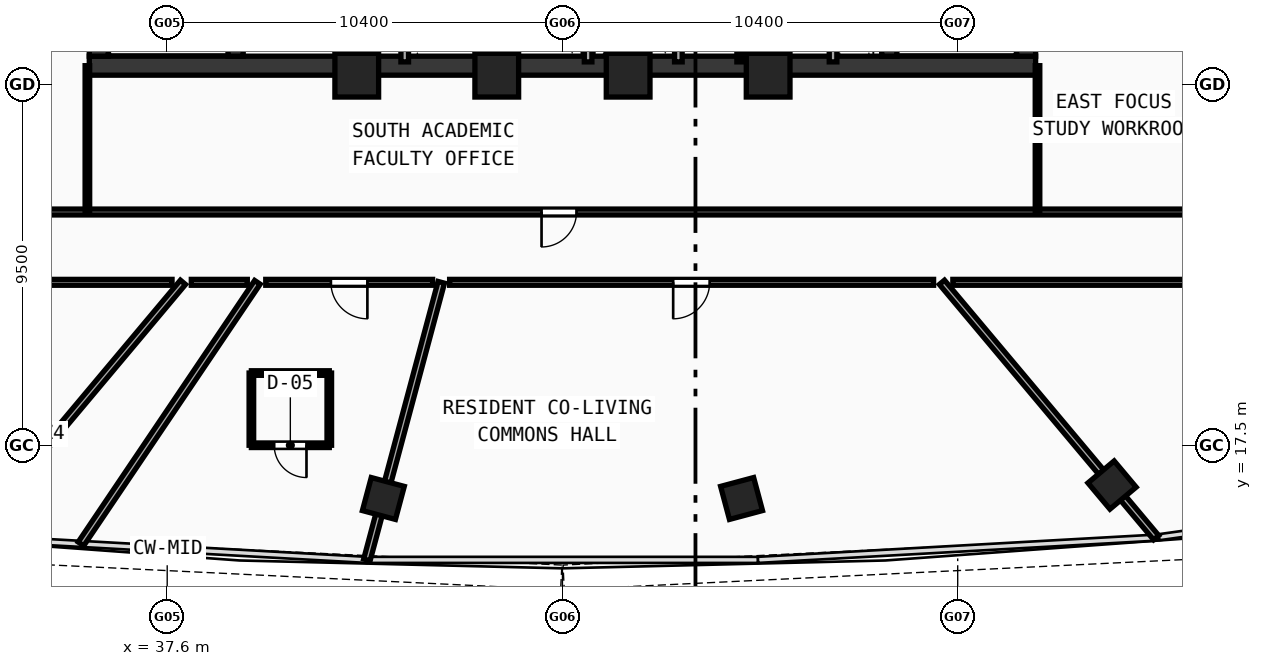
"""IFC4 building model, lengths in metres.
Left out: names, types, materials, properties, quantities, classifications, styles, units other than length and angle.
Written with IfcOpenShell. Run it as: python <this file> out.ifc"""

import sys

from ifc_helpers import new_model, si_unit, direction, frame, frame_2d, origin, origin_with_axes, origin_2d, place, context, subcontext, project, spatial, rectangle, hollow_rectangle, extrude, source, transform, mapped, element, fill, save


model = new_model("IFC4")
c1 = context("Model", 3, precision=1e-05, world=origin(), true_north=direction((0.0, 1.0)))
c2 = subcontext(c1, "Body", "Model", "MODEL_VIEW")
j1 = project(units=[si_unit("LENGTHUNIT", "METRE"), si_unit("PLANEANGLEUNIT", "RADIAN")], contexts=[c1])
p1 = place(None, origin())
s1 = spatial("IfcSite", under=j1, at=p1, CompositionType="ELEMENT")
p2 = place(p1, origin())
s2 = spatial("IfcBuilding", under=s1, at=p2, CompositionType="ELEMENT")
p3 = place(p2, frame((0.0, 0.0, 207.56)))
s3 = spatial("IfcBuildingStorey", under=s2, at=p3, CompositionType="ELEMENT", Elevation=207.56)
p4 = place(p3, frame((35.55, 27.5, 0.0), z_axis=(0.0, 0.0, 1.0), x_axis=(1.0, 0.0, 0.0)))
e1 = element("IfcWall", 1, at=p4, inside=s3, PredefinedType="SHEAR", context=c2, shape_type="SweptSolid", body=[
    extrude(rectangle(XDim=24.9, YDim=0.5, at=frame_2d((12.45, 0.0))), origin(), (0.0, 0.0, 1.0), 3.54),
])
for number, where, z_axis, x_axis in (
    (2, (35.8, 27.75, 0.0), (0.0, 0.0, 1.0), (0.0, 1.0, 0.0)),
    (3, (60.2, 27.75, 0.0), (0.0, 0.0, 1.0), (0.0, 1.0, 0.0)),
):
    element("IfcWall", number, at=place(p3, frame(where, z_axis=z_axis, x_axis=x_axis)), inside=s3, PredefinedType="SHEAR", context=c2, shape_type="SweptSolid", body=[
        extrude(rectangle(XDim=12.2, YDim=0.5, at=frame_2d((6.1, 0.0))), origin(), (0.0, 0.0, 1.0), 3.54),
    ])
p5 = place(p3, frame((39.4, 27.75, 0.0), z_axis=(0.0, 0.0, 1.0), x_axis=(0.0, 1.0, 0.0)))
e4 = element("IfcWall", 4, at=p5, inside=s3, PredefinedType="SHEAR", context=c2, shape_type="SweptSolid", body=[
    extrude(rectangle(XDim=12.2, YDim=0.4, at=frame_2d((6.1, 0.0))), origin(), (0.0, 0.0, 1.0), 3.54),
])
p6 = place(p5, frame((10.0, 0.0, 0.0)))
e5 = element("IfcOpeningElement", 5, at=p6, cuts=e4, PredefinedType="OPENING", context=c2, shape_type="SweptSolid", body=[
    extrude(rectangle(XDim=1.1, YDim=2.1, at=frame_2d((0.55, 1.05))), frame((0.0, 0.21, 0.0), z_axis=(0.0, -1.0, 0.0), x_axis=(1.0, 0.0, 0.0)), (0.0, 0.0, 1.0), 0.42),
])
p7 = place(p3, frame((56.6, 27.75, 0.0), z_axis=(0.0, 0.0, 1.0), x_axis=(0.0, 1.0, 0.0)))
e6 = element("IfcWall", 6, at=p7, inside=s3, PredefinedType="SHEAR", context=c2, shape_type="SweptSolid", body=[
    extrude(rectangle(XDim=12.2, YDim=0.4, at=frame_2d((6.1, 0.0))), origin(), (0.0, 0.0, 1.0), 3.54),
])
p8 = place(p7, frame((10.0, 0.0, 0.0)))
e7 = element("IfcOpeningElement", 7, at=p8, cuts=e6, PredefinedType="OPENING", context=c2, shape_type="SweptSolid", body=[
    extrude(rectangle(XDim=1.1, YDim=2.1, at=frame_2d((0.55, 1.05))), frame((0.0, 0.21, 0.0), z_axis=(0.0, -1.0, 0.0), x_axis=(1.0, 0.0, 0.0)), (0.0, 0.0, 1.0), 0.42),
])
m1 = source(origin(), c2, "Body", "SweptSolid", [
    extrude(hollow_rectangle(XDim=1.15, YDim=1.15, WallThickness=0.048, at=origin_2d()), origin(), (0.0, 0.0, 1.0), 3.8),
])
for number, where, z_axis, x_axis in (
    (8, (42.588, 27.25, -0.26), (0.0, 0.0, 1.0), (1.0, 0.0, 0.0)),
    (9, (46.272, 27.25, -0.26), (0.0, 0.0, 1.0), (1.0, 0.0, 0.0)),
    (10, (49.729, 27.25, -0.26), (0.0, 0.0, 1.0), (1.0, 0.0, 0.0)),
    (11, (53.412, 27.25, -0.26), (0.0, 0.0, 1.0), (1.0, 0.0, 0.0)),
):
    element("IfcColumn", number, at=place(p3, frame(where, z_axis=z_axis, x_axis=x_axis)), inside=s3, PredefinedType="COLUMN", context=c2, shape_type="MappedRepresentation", body=[
        mapped(m1, transform((0.0, 0.0, 0.0), scale=1.0)),
    ])
m2 = source(origin(), c2, "Body", "SweptSolid", [
    extrude(hollow_rectangle(XDim=0.9, YDim=0.9, WallThickness=0.036, at=origin_2d()), origin(), (0.0, 0.0, 1.0), 3.8),
])
for number, where, z_axis, x_axis in (
    (12, (43.288, 16.112, -0.26), (0.0, 0.0, 1.0), (0.966, -0.259, 0.0)),
    (13, (52.713, 16.112, -0.26), (0.0, 0.0, 1.0), (0.966, 0.259, 0.0)),
    (14, (62.461, 16.466, -0.26), (0.0, 0.0, 1.0), (0.766, 0.643, 0.0)),
):
    element("IfcColumn", number, at=place(p3, frame(where, z_axis=z_axis, x_axis=x_axis)), inside=s3, PredefinedType="COLUMN", context=c2, shape_type="MappedRepresentation", body=[
        mapped(m2, transform((0.0, 0.0, 0.0), scale=1.0)),
    ])
p9 = place(p3, frame((43.85, 27.6, 0.0), z_axis=(0.0, 0.0, 1.0), x_axis=(0.0, 1.0, 0.0)))
e15 = element("IfcWall", 15, at=p9, inside=s3, PredefinedType="SOLIDWALL", context=c2, shape_type="SweptSolid", body=[
    extrude(rectangle(XDim=6.22, YDim=0.2, at=frame_2d((3.11, 0.0))), origin(), (0.0, 0.0, 1.0), 3.54),
])
p10 = place(p9, frame((2.25, 0.0, 0.0)))
e16 = element("IfcOpeningElement", 16, at=p10, cuts=e15, PredefinedType="OPENING", context=c2, shape_type="SweptSolid", body=[
    extrude(rectangle(XDim=1.05, YDim=2.1, at=frame_2d((0.525, 1.05))), frame((0.0, 0.11, 0.0), z_axis=(0.0, -1.0, 0.0), x_axis=(1.0, 0.0, 0.0)), (0.0, 0.0, 1.0), 0.22),
])
p11 = place(p3, frame((53.68, 27.6, 0.0), z_axis=(0.0, 0.0, 1.0), x_axis=(0.0, 1.0, 0.0)))
e17 = element("IfcWall", 17, at=p11, inside=s3, PredefinedType="SOLIDWALL", context=c2, shape_type="SweptSolid", body=[
    extrude(rectangle(XDim=9.05, YDim=0.2, at=frame_2d((4.525, 0.0))), origin(), (0.0, 0.0, 1.0), 3.54),
])
p12 = place(p11, frame((6.9, 0.0, 0.0)))
e18 = element("IfcOpeningElement", 18, at=p12, cuts=e17, PredefinedType="OPENING", context=c2, shape_type="SweptSolid", body=[
    extrude(rectangle(XDim=1.05, YDim=2.1, at=frame_2d((0.525, 1.05))), frame((0.0, 0.11, 0.0), z_axis=(0.0, -1.0, 0.0), x_axis=(1.0, 0.0, 0.0)), (0.0, 0.0, 1.0), 0.22),
])
for number, where, z_axis, x_axis in (
    (19, (51.05, 27.6, 0.0), (0.0, 0.0, 1.0), (0.0, 1.0, 0.0)),
    (20, (46.225, 27.6, 0.0), (0.0, 0.0, 1.0), (0.0, 1.0, 0.0)),
    (21, (48.675, 27.6, 0.0), (0.0, 0.0, 1.0), (0.0, 1.0, 0.0)),
    (22, (55.12, 27.6, 0.0), (0.0, 0.0, 1.0), (0.0, 1.0, 0.0)),
):
    element("IfcWall", number, at=place(p3, frame(where, z_axis=z_axis, x_axis=x_axis)), inside=s3, PredefinedType="SOLIDWALL", context=c2, shape_type="SweptSolid", body=[
        extrude(rectangle(XDim=2.12, YDim=0.2, at=frame_2d((1.06, 0.0))), origin(), (0.0, 0.0, 1.0), 3.54),
    ])
p13 = place(p3, frame((42.32, 27.6, 0.0), z_axis=(0.0, 0.0, 1.0), x_axis=(0.0, 1.0, 0.0)))
e23 = element("IfcWall", 23, at=p13, inside=s3, PredefinedType="PARTITIONING", context=c2, shape_type="SweptSolid", body=[
    extrude(rectangle(XDim=5.9, YDim=0.155, at=frame_2d((2.95, 0.0))), origin(), (0.0, 0.0, 1.0), 3.54),
])
p14 = place(p13, frame((1.4, 0.0, 0.0)))
e24 = element("IfcOpeningElement", 24, at=p14, cuts=e23, PredefinedType="OPENING", context=c2, shape_type="SweptSolid", body=[
    extrude(rectangle(XDim=0.9, YDim=2.1, at=frame_2d((0.45, 1.05))), frame((0.0, 0.087, 0.0), z_axis=(0.0, -1.0, 0.0), x_axis=(1.0, 0.0, 0.0)), (0.0, 0.0, 1.0), 0.175),
])
p15 = place(p13, frame((4.45, 0.0, 0.0)))
e25 = element("IfcOpeningElement", 25, at=p15, cuts=e23, PredefinedType="OPENING", context=c2, shape_type="SweptSolid", body=[
    extrude(rectangle(XDim=0.9, YDim=2.1, at=frame_2d((0.45, 1.05))), frame((0.0, 0.087, 0.0), z_axis=(0.0, -1.0, 0.0), x_axis=(1.0, 0.0, 0.0)), (0.0, 0.0, 1.0), 0.175),
])
p16 = place(p3, frame((52.65, 27.6, 0.0), z_axis=(0.0, 0.0, 1.0), x_axis=(0.0, 1.0, 0.0)))
e26 = element("IfcWall", 26, at=p16, inside=s3, PredefinedType="PARTITIONING", context=c2, shape_type="SweptSolid", body=[
    extrude(rectangle(XDim=2.12, YDim=0.12, at=frame_2d((1.06, 0.0))), origin(), (0.0, 0.0, 1.0), 3.54),
])
p17 = place(p3, frame((31.45, 23.65, 0.0), z_axis=(0.0, 0.0, 1.0), x_axis=(1.0, 0.0, 0.0)))
e27 = element("IfcWall", 27, at=p17, inside=s3, PredefinedType="PARTITIONING", context=c2, shape_type="SweptSolid", body=[
    extrude(rectangle(XDim=33.1, YDim=0.155, at=frame_2d((16.55, 0.0))), origin(), (0.0, 0.0, 1.0), 2.89),
])
p18 = place(p17, frame((16.0, 0.0, 0.0)))
e28 = element("IfcOpeningElement", 28, at=p18, cuts=e27, PredefinedType="OPENING", context=c2, shape_type="SweptSolid", body=[
    extrude(rectangle(XDim=0.92, YDim=2.1, at=frame_2d((0.46, 1.05))), frame((0.0, 0.087, 0.0), z_axis=(0.0, -1.0, 0.0), x_axis=(1.0, 0.0, 0.0)), (0.0, 0.0, 1.0), 0.175),
])
for number, where, z_axis, x_axis in (
    (29, (35.5, 23.65, 0.0), (0.0, 0.0, 1.0), (0.0, 1.0, 0.0)),
    (30, (60.5, 23.65, 0.0), (0.0, 0.0, 1.0), (0.0, 1.0, 0.0)),
):
    element("IfcWall", number, at=place(p3, frame(where, z_axis=z_axis, x_axis=x_axis)), inside=s3, PredefinedType="PARTITIONING", context=c2, shape_type="SweptSolid", body=[
        extrude(rectangle(XDim=3.85, YDim=0.12, at=frame_2d((1.925, 0.0))), origin(), (0.0, 0.0, 1.0), 3.14),
    ])
p19 = place(p3, frame((38.015, 21.8, 0.0), z_axis=(0.0, 0.0, 1.0), x_axis=(-0.642774108653, -0.766055771629, 0.0)))
e31 = element("IfcWall", 31, at=p19, inside=s3, PredefinedType="PARTITIONING", context=c2, shape_type="SweptSolid", body=[
    extrude(rectangle(XDim=8.769, YDim=0.175, at=frame_2d((4.385, 0.0))), origin(), (0.0, 0.0, 1.0), 2.89),
])
p20 = place(p3, frame((39.973, 21.8, 0.0), z_axis=(0.0, 0.0, 1.0), x_axis=(-0.559191496738, -0.829038521406, 0.0)))
e32 = element("IfcWall", 32, at=p20, inside=s3, PredefinedType="PARTITIONING", context=c2, shape_type="SweptSolid", body=[
    extrude(rectangle(XDim=8.302, YDim=0.175, at=frame_2d((4.151, 0.0))), origin(), (0.0, 0.0, 1.0), 2.89),
])
p21 = place(p3, frame((44.811, 21.8, 0.0), z_axis=(0.0, 0.0, 1.0), x_axis=(-0.25880602585, -0.965929314693, 0.0)))
e33 = element("IfcWall", 33, at=p21, inside=s3, PredefinedType="PARTITIONING", context=c2, shape_type="SweptSolid", body=[
    extrude(rectangle(XDim=7.561, YDim=0.175, at=frame_2d((3.78, 0.0))), origin(), (0.0, 0.0, 1.0), 2.89),
])
p22 = place(p3, frame((57.985, 21.8, 0.0), z_axis=(0.0, 0.0, 1.0), x_axis=(0.642774108653, -0.766055771629, 0.0)))
e34 = element("IfcWall", 34, at=p22, inside=s3, PredefinedType="PARTITIONING", context=c2, shape_type="SweptSolid", body=[
    extrude(rectangle(XDim=8.769, YDim=0.175, at=frame_2d((4.385, 0.0))), origin(), (0.0, 0.0, 1.0), 2.89),
])
p23 = place(p3, frame((66.4, 21.8, 0.0), z_axis=(0.0, 0.0, 1.0), x_axis=(-1.0, 0.0, 0.0)))
e35 = element("IfcWall", 35, at=p23, inside=s3, PredefinedType="PARTITIONING", context=c2, shape_type="SweptSolid", body=[
    extrude(rectangle(XDim=8.127, YDim=0.155, at=frame_2d((4.064, 0.0))), origin(), (0.0, 0.0, 1.0), 3.14),
])
p24 = place(p3, frame((57.765, 21.8, 0.0), z_axis=(0.0, 0.0, 1.0), x_axis=(-1.0, 0.0, 0.0)))
e36 = element("IfcWall", 36, at=p24, inside=s3, PredefinedType="PARTITIONING", context=c2, shape_type="SweptSolid", body=[
    extrude(rectangle(XDim=12.734, YDim=0.155, at=frame_2d((6.367, 0.0))), origin(), (0.0, 0.0, 1.0), 2.89),
])
p25 = place(p24, frame((5.892, 0.0, 0.0)))
e37 = element("IfcOpeningElement", 37, at=p25, cuts=e36, PredefinedType="OPENING", context=c2, shape_type="SweptSolid", body=[
    extrude(rectangle(XDim=0.96, YDim=2.12, at=frame_2d((0.48, 1.06))), frame((0.0, 0.087, 0.0), z_axis=(0.0, -1.0, 0.0), x_axis=(1.0, 0.0, 0.0)), (0.0, 0.0, 1.0), 0.175),
])
p26 = place(p3, frame((44.583, 21.8, 0.0), z_axis=(0.0, 0.0, 1.0), x_axis=(-1.0, 0.0, 0.0)))
e38 = element("IfcWall", 38, at=p26, inside=s3, PredefinedType="PARTITIONING", context=c2, shape_type="SweptSolid", body=[
    extrude(rectangle(XDim=4.39, YDim=0.155, at=frame_2d((2.195, 0.0))), origin(), (0.0, 0.0, 1.0), 3.54),
])
p27 = place(p26, frame((1.716, 0.0, 0.0)))
e39 = element("IfcOpeningElement", 39, at=p27, cuts=e38, PredefinedType="OPENING", context=c2, shape_type="SweptSolid", body=[
    extrude(rectangle(XDim=0.96, YDim=2.12, at=frame_2d((0.48, 1.06))), frame((0.0, 0.087, 0.0), z_axis=(0.0, -1.0, 0.0), x_axis=(1.0, 0.0, 0.0)), (0.0, 0.0, 1.0), 0.175),
])
p28 = place(p3, frame((39.708, 21.8, 0.0), z_axis=(0.0, 0.0, 1.0), x_axis=(-1.0, 0.0, 0.0)))
e40 = element("IfcWall", 40, at=p28, inside=s3, PredefinedType="PARTITIONING", context=c2, shape_type="SweptSolid", body=[
    extrude(rectangle(XDim=1.473, YDim=0.155, at=frame_2d((0.737, 0.0))), origin(), (0.0, 0.0, 1.0), 2.89),
])
p29 = place(p3, frame((37.728, 21.8, 0.0), z_axis=(0.0, 0.0, 1.0), x_axis=(-1.0, 0.0, 0.0)))
e41 = element("IfcWall", 41, at=p29, inside=s3, PredefinedType="PARTITIONING", context=c2, shape_type="SweptSolid", body=[
    extrude(rectangle(XDim=8.127, YDim=0.155, at=frame_2d((4.064, 0.0))), origin(), (0.0, 0.0, 1.0), 3.14),
])
p30 = place(p3, frame((39.815, 17.513, 0.0), z_axis=(0.0, 0.0, 1.0), x_axis=(1.0, 0.0, 0.0)))
e42 = element("IfcWall", 42, at=p30, inside=s3, PredefinedType="PARTITIONING", context=c2, shape_type="SweptSolid", body=[
    extrude(rectangle(XDim=2.05, YDim=0.12, at=frame_2d((1.025, 0.0))), origin(), (0.0, 0.0, 1.0), 3.54),
])
p31 = place(p30, frame((0.6, 0.0, 0.0)))
e43 = element("IfcOpeningElement", 43, at=p31, cuts=e42, PredefinedType="OPENING", context=c2, shape_type="SweptSolid", body=[
    extrude(rectangle(XDim=0.85, YDim=2.1, at=frame_2d((0.425, 1.05))), frame((0.0, 0.07, 0.0), z_axis=(0.0, -1.0, 0.0), x_axis=(1.0, 0.0, 0.0)), (0.0, 0.0, 1.0), 0.14),
])
p32 = place(p3, frame((41.865, 17.513, 0.0), z_axis=(0.0, 0.0, 1.0), x_axis=(0.0, 1.0, 0.0)))
e44 = element("IfcWall", 44, at=p32, inside=s3, PredefinedType="PARTITIONING", context=c2, shape_type="SweptSolid", body=[
    extrude(rectangle(XDim=1.9, YDim=0.12, at=frame_2d((0.95, 0.0))), origin(), (0.0, 0.0, 1.0), 3.54),
])
p33 = place(p3, frame((41.865, 19.413, 0.0), z_axis=(0.0, 0.0, 1.0), x_axis=(-1.0, 0.0, 0.0)))
e45 = element("IfcWall", 45, at=p33, inside=s3, PredefinedType="PARTITIONING", context=c2, shape_type="SweptSolid", body=[
    extrude(rectangle(XDim=2.05, YDim=0.12, at=frame_2d((1.025, 0.0))), origin(), (0.0, 0.0, 1.0), 3.54),
])
p34 = place(p3, frame((39.815, 19.413, 0.0), z_axis=(0.0, 0.0, 1.0), x_axis=(0.0, -1.0, 0.0)))
e46 = element("IfcWall", 46, at=p34, inside=s3, PredefinedType="PARTITIONING", context=c2, shape_type="SweptSolid", body=[
    extrude(rectangle(XDim=1.9, YDim=0.12, at=frame_2d((0.95, 0.0))), origin(), (0.0, 0.0, 1.0), 3.54),
])
m3 = source(origin(), c2, "Body", "SweptSolid", [
    extrude(rectangle(XDim=0.92, YDim=2.1, at=frame_2d((0.46, 1.05))), frame((0.0, 0.025, 0.0), z_axis=(0.0, -1.0, 0.0), x_axis=(1.0, 0.0, 0.0)), (0.0, 0.0, 1.0), 0.05),
])
p35 = place(p18, frame((0.92, 0.0, 0.0), z_axis=(0.0, 0.0, 1.0), x_axis=(-1.0, 0.0, 0.0)))
e47 = element("IfcDoor", 47, at=p35, inside=s3, OperationType="SINGLE_SWING_RIGHT", PredefinedType="DOOR", context=c2, shape_type="MappedRepresentation", body=[
    mapped(m3, transform((0.0, 0.0, 0.0), scale=1.0)),
])
fill(e28, e47)
m4 = source(origin(), c2, "Body", "SweptSolid", [
    extrude(rectangle(XDim=0.96, YDim=2.12, at=frame_2d((0.48, 1.06))), frame((0.0, 0.025, 0.0), z_axis=(0.0, -1.0, 0.0), x_axis=(1.0, 0.0, 0.0)), (0.0, 0.0, 1.0), 0.05),
])
p36 = place(p27, origin_with_axes())
e48 = element("IfcDoor", 48, at=p36, inside=s3, OperationType="SINGLE_SWING_LEFT", PredefinedType="DOOR", context=c2, shape_type="MappedRepresentation", body=[
    mapped(m4, transform((0.0, 0.0, 0.0), scale=1.0)),
])
fill(e39, e48)
m5 = source(origin(), c2, "Body", "SweptSolid", [
    extrude(rectangle(XDim=0.85, YDim=2.1, at=frame_2d((0.425, 1.05))), frame((0.0, 0.025, 0.0), z_axis=(0.0, -1.0, 0.0), x_axis=(1.0, 0.0, 0.0)), (0.0, 0.0, 1.0), 0.05),
])
p37 = place(p31, frame((0.85, 0.0, 0.0), z_axis=(0.0, 0.0, 1.0), x_axis=(-1.0, 0.0, 0.0)))
e49 = element("IfcDoor", 49, at=p37, inside=s3, OperationType="SINGLE_SWING_LEFT", PredefinedType="DOOR", context=c2, shape_type="MappedRepresentation", body=[
    mapped(m5, transform((0.0, 0.0, 0.0), scale=1.0)),
])
fill(e43, e49)
p38 = place(p25, origin_with_axes())
e50 = element("IfcDoor", 50, at=p38, inside=s3, OperationType="SINGLE_SWING_RIGHT", PredefinedType="DOOR", context=c2, shape_type="MappedRepresentation", body=[
    mapped(m4, transform((0.0, 0.0, 0.0), scale=1.0)),
])
fill(e37, e50)
save(model, sys.argv[1])
